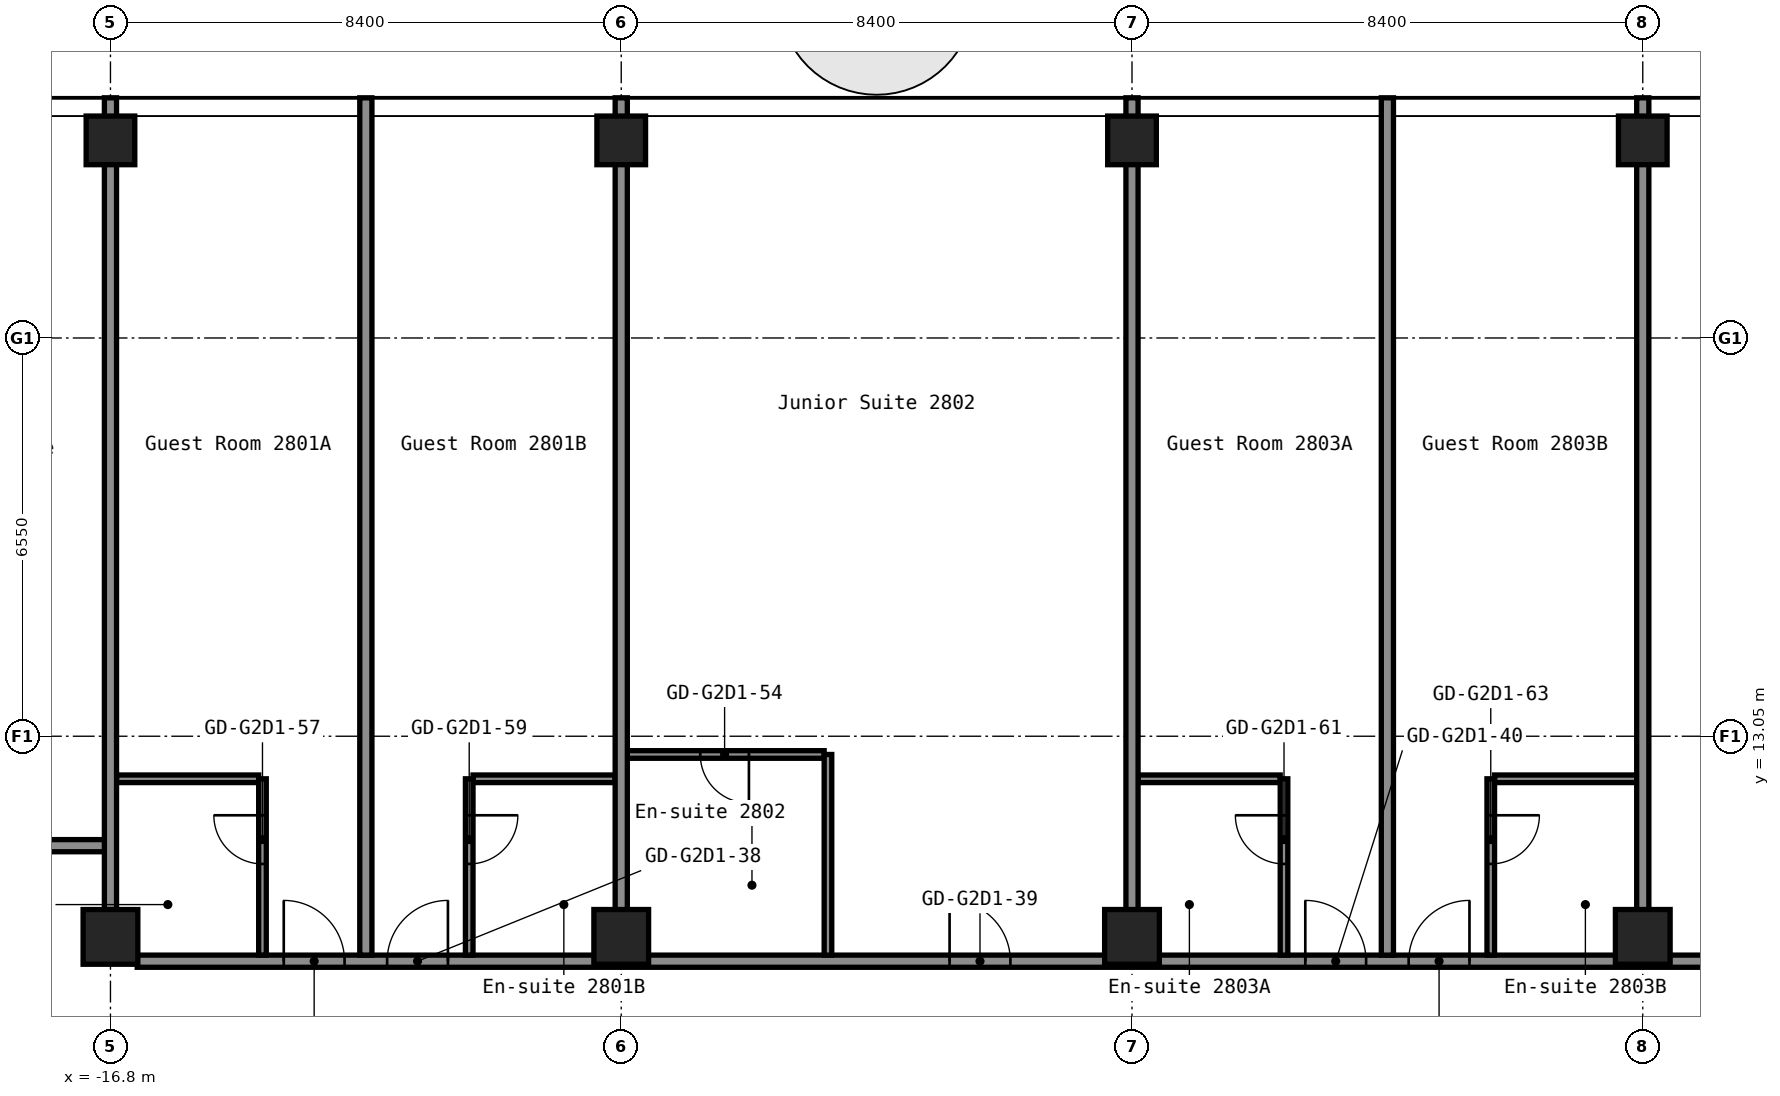
"""IFC4 building model, lengths in metres.
Left out: names, types, materials, properties, quantities, classifications, styles, units other than length and angle.
Written with IfcOpenShell. Run it as: python <this file> out.ifc"""

import sys

from ifc_helpers import new_model, si_unit, direction, frame, frame_2d, origin, origin_2d, place, context, subcontext, project, spatial, rectangle, hollow_rectangle, extrude, element, fill, save


model = new_model("IFC4")
c1 = context("Model", 3, precision=1e-05, world=origin(), true_north=direction((0.0, 1.0)))
c2 = subcontext(c1, "Body", "Model", "MODEL_VIEW")
j1 = project(units=[si_unit("LENGTHUNIT", "METRE"), si_unit("PLANEANGLEUNIT", "RADIAN")], contexts=[c1])
p1 = place(None, origin())
s1 = spatial("IfcSite", under=j1, at=p1, CompositionType="ELEMENT")
p2 = place(p1, origin())
s2 = spatial("IfcBuilding", under=s1, at=p2, CompositionType="ELEMENT")
p3 = place(p2, frame((0.0, 0.0, 101.0)))
s3 = spatial("IfcBuildingStorey", under=s2, at=p3, CompositionType="ELEMENT", Elevation=101.0)
p4 = place(p3, frame((-16.8, 9.75, 0.0), z_axis=(0.0, 0.0, 1.0), x_axis=(1.0, 0.0, 0.0)))
e1 = element("IfcColumn", 1, at=p4, inside=s3, PredefinedType="COLUMN", context=c2, shape_type="SweptSolid", body=[
    extrude(hollow_rectangle(XDim=0.9, YDim=0.9, WallThickness=0.036, at=origin_2d()), origin(), (0.0, 0.0, 1.0), 2.8),
])
p5 = place(p3, frame((-16.8, 22.85, 0.0), z_axis=(0.0, 0.0, 1.0), x_axis=(1.0, 0.0, 0.0)))
e2 = element("IfcColumn", 2, at=p5, inside=s3, PredefinedType="COLUMN", context=c2, shape_type="SweptSolid", body=[
    extrude(hollow_rectangle(XDim=0.8, YDim=0.8, WallThickness=0.032, at=origin_2d()), origin(), (0.0, 0.0, 1.0), 2.8),
])
p6 = place(p3, frame((-8.4, 9.75, 0.0), z_axis=(0.0, 0.0, 1.0), x_axis=(1.0, 0.0, 0.0)))
e3 = element("IfcColumn", 3, at=p6, inside=s3, PredefinedType="COLUMN", context=c2, shape_type="SweptSolid", body=[
    extrude(hollow_rectangle(XDim=0.9, YDim=0.9, WallThickness=0.036, at=origin_2d()), origin(), (0.0, 0.0, 1.0), 2.8),
])
p7 = place(p3, frame((-8.4, 22.85, 0.0), z_axis=(0.0, 0.0, 1.0), x_axis=(1.0, 0.0, 0.0)))
e4 = element("IfcColumn", 4, at=p7, inside=s3, PredefinedType="COLUMN", context=c2, shape_type="SweptSolid", body=[
    extrude(hollow_rectangle(XDim=0.8, YDim=0.8, WallThickness=0.032, at=origin_2d()), origin(), (0.0, 0.0, 1.0), 2.8),
])
p8 = place(p3, frame((0.0, 9.75, 0.0), z_axis=(0.0, 0.0, 1.0), x_axis=(1.0, 0.0, 0.0)))
e5 = element("IfcColumn", 5, at=p8, inside=s3, PredefinedType="COLUMN", context=c2, shape_type="SweptSolid", body=[
    extrude(hollow_rectangle(XDim=0.9, YDim=0.9, WallThickness=0.036, at=origin_2d()), origin(), (0.0, 0.0, 1.0), 2.8),
])
p9 = place(p3, frame((0.0, 22.85, 0.0), z_axis=(0.0, 0.0, 1.0), x_axis=(1.0, 0.0, 0.0)))
e6 = element("IfcColumn", 6, at=p9, inside=s3, PredefinedType="COLUMN", context=c2, shape_type="SweptSolid", body=[
    extrude(hollow_rectangle(XDim=0.8, YDim=0.8, WallThickness=0.032, at=origin_2d()), origin(), (0.0, 0.0, 1.0), 2.8),
])
p10 = place(p3, frame((8.4, 9.75, 0.0), z_axis=(0.0, 0.0, 1.0), x_axis=(1.0, 0.0, 0.0)))
e7 = element("IfcColumn", 7, at=p10, inside=s3, PredefinedType="COLUMN", context=c2, shape_type="SweptSolid", body=[
    extrude(hollow_rectangle(XDim=0.9, YDim=0.9, WallThickness=0.036, at=origin_2d()), origin(), (0.0, 0.0, 1.0), 2.8),
])
p11 = place(p3, frame((8.4, 22.85, 0.0), z_axis=(0.0, 0.0, 1.0), x_axis=(1.0, 0.0, 0.0)))
e8 = element("IfcColumn", 8, at=p11, inside=s3, PredefinedType="COLUMN", context=c2, shape_type="SweptSolid", body=[
    extrude(hollow_rectangle(XDim=0.8, YDim=0.8, WallThickness=0.032, at=origin_2d()), origin(), (0.0, 0.0, 1.0), 2.8),
])
p12 = place(p3, frame((-16.36, 9.35, 0.0), z_axis=(0.0, 0.0, 1.0), x_axis=(1.0, 0.0, 0.0)))
e9 = element("IfcWall", 9, at=p12, inside=s3, PredefinedType="PARTITIONING", context=c2, shape_type="SweptSolid", body=[
    extrude(rectangle(XDim=32.72, YDim=0.2, at=frame_2d((16.36, 0.0))), origin(), (0.0, 0.0, 1.0), 2.8),
])
p13 = place(p12, frame((2.41, 0.0, 0.0)))
e10 = element("IfcOpeningElement", 10, at=p13, cuts=e9, PredefinedType="OPENING", context=c2, shape_type="SweptSolid", body=[
    extrude(rectangle(XDim=1.0, YDim=2.1, at=frame_2d((0.5, 1.05))), frame((0.0, 0.11, 0.0), z_axis=(0.0, -1.0, 0.0), x_axis=(1.0, 0.0, 0.0)), (0.0, 0.0, 1.0), 0.22),
])
p14 = place(p12, frame((4.11, 0.0, 0.0)))
e11 = element("IfcOpeningElement", 11, at=p14, cuts=e9, PredefinedType="OPENING", context=c2, shape_type="SweptSolid", body=[
    extrude(rectangle(XDim=1.0, YDim=2.1, at=frame_2d((0.5, 1.05))), frame((0.0, 0.11, 0.0), z_axis=(0.0, -1.0, 0.0), x_axis=(1.0, 0.0, 0.0)), (0.0, 0.0, 1.0), 0.22),
])
p15 = place(p12, frame((13.36, 0.0, 0.0)))
e12 = element("IfcOpeningElement", 12, at=p15, cuts=e9, PredefinedType="OPENING", context=c2, shape_type="SweptSolid", body=[
    extrude(rectangle(XDim=1.0, YDim=2.1, at=frame_2d((0.5, 1.05))), frame((0.0, 0.11, 0.0), z_axis=(0.0, -1.0, 0.0), x_axis=(1.0, 0.0, 0.0)), (0.0, 0.0, 1.0), 0.22),
])
p16 = place(p12, frame((19.21, 0.0, 0.0)))
e13 = element("IfcOpeningElement", 13, at=p16, cuts=e9, PredefinedType="OPENING", context=c2, shape_type="SweptSolid", body=[
    extrude(rectangle(XDim=1.0, YDim=2.1, at=frame_2d((0.5, 1.05))), frame((0.0, 0.11, 0.0), z_axis=(0.0, -1.0, 0.0), x_axis=(1.0, 0.0, 0.0)), (0.0, 0.0, 1.0), 0.22),
])
p17 = place(p12, frame((20.91, 0.0, 0.0)))
e14 = element("IfcOpeningElement", 14, at=p17, cuts=e9, PredefinedType="OPENING", context=c2, shape_type="SweptSolid", body=[
    extrude(rectangle(XDim=1.0, YDim=2.1, at=frame_2d((0.5, 1.05))), frame((0.0, 0.11, 0.0), z_axis=(0.0, -1.0, 0.0), x_axis=(1.0, 0.0, 0.0)), (0.0, 0.0, 1.0), 0.22),
])
p18 = place(p12, frame((26.76, 0.0, 0.0)))
e15 = element("IfcOpeningElement", 15, at=p18, cuts=e9, PredefinedType="OPENING", context=c2, shape_type="SweptSolid", body=[
    extrude(rectangle(XDim=1.0, YDim=2.1, at=frame_2d((0.5, 1.05))), frame((0.0, 0.11, 0.0), z_axis=(0.0, -1.0, 0.0), x_axis=(1.0, 0.0, 0.0)), (0.0, 0.0, 1.0), 0.22),
])
p19 = place(p3, frame((-46.5, 11.25, 0.0), z_axis=(0.0, 0.0, 1.0), x_axis=(1.0, 0.0, 0.0)))
e16 = element("IfcWall", 16, at=p19, inside=s3, PredefinedType="PARTITIONING", context=c2, shape_type="SweptSolid", body=[
    extrude(rectangle(XDim=29.7, YDim=0.2, at=frame_2d((14.85, 0.0))), origin(), (0.0, 0.0, 1.0), 2.8),
])
p20 = place(p19, frame((1.95, 0.0, 0.0)))
e17 = element("IfcOpeningElement", 17, at=p20, cuts=e16, PredefinedType="OPENING", context=c2, shape_type="SweptSolid", body=[
    extrude(rectangle(XDim=0.9, YDim=2.1, at=frame_2d((0.45, 1.05))), frame((0.0, 0.11, 0.0), z_axis=(0.0, -1.0, 0.0), x_axis=(1.0, 0.0, 0.0)), (0.0, 0.0, 1.0), 0.22),
])
p21 = place(p19, frame((6.655, 0.0, 0.0)))
e18 = element("IfcOpeningElement", 18, at=p21, cuts=e16, PredefinedType="OPENING", context=c2, shape_type="SweptSolid", body=[
    extrude(rectangle(XDim=0.9, YDim=2.1, at=frame_2d((0.45, 1.05))), frame((0.0, 0.11, 0.0), z_axis=(0.0, -1.0, 0.0), x_axis=(1.0, 0.0, 0.0)), (0.0, 0.0, 1.0), 0.22),
])
p22 = place(p19, frame((10.855, 0.0, 0.0)))
e19 = element("IfcOpeningElement", 19, at=p22, cuts=e16, PredefinedType="OPENING", context=c2, shape_type="SweptSolid", body=[
    extrude(rectangle(XDim=0.9, YDim=2.1, at=frame_2d((0.45, 1.05))), frame((0.0, 0.11, 0.0), z_axis=(0.0, -1.0, 0.0), x_axis=(1.0, 0.0, 0.0)), (0.0, 0.0, 1.0), 0.22),
])
p23 = place(p19, frame((14.13, 0.0, 0.0)))
e20 = element("IfcOpeningElement", 20, at=p23, cuts=e16, PredefinedType="OPENING", context=c2, shape_type="SweptSolid", body=[
    extrude(rectangle(XDim=0.9, YDim=2.1, at=frame_2d((0.45, 1.05))), frame((0.0, 0.11, 0.0), z_axis=(0.0, -1.0, 0.0), x_axis=(1.0, 0.0, 0.0)), (0.0, 0.0, 1.0), 0.22),
])
p24 = place(p19, frame((18.33, 0.0, 0.0)))
e21 = element("IfcOpeningElement", 21, at=p24, cuts=e16, PredefinedType="OPENING", context=c2, shape_type="SweptSolid", body=[
    extrude(rectangle(XDim=0.9, YDim=2.1, at=frame_2d((0.45, 1.05))), frame((0.0, 0.11, 0.0), z_axis=(0.0, -1.0, 0.0), x_axis=(1.0, 0.0, 0.0)), (0.0, 0.0, 1.0), 0.22),
])
p25 = place(p19, frame((22.78, 0.0, 0.0)))
e22 = element("IfcOpeningElement", 22, at=p25, cuts=e16, PredefinedType="OPENING", context=c2, shape_type="SweptSolid", body=[
    extrude(rectangle(XDim=0.9, YDim=2.1, at=frame_2d((0.45, 1.05))), frame((0.0, 0.11, 0.0), z_axis=(0.0, -1.0, 0.0), x_axis=(1.0, 0.0, 0.0)), (0.0, 0.0, 1.0), 0.22),
])
p26 = place(p19, frame((26.98, 0.0, 0.0)))
e23 = element("IfcOpeningElement", 23, at=p26, cuts=e16, PredefinedType="OPENING", context=c2, shape_type="SweptSolid", body=[
    extrude(rectangle(XDim=0.9, YDim=2.1, at=frame_2d((0.45, 1.05))), frame((0.0, 0.11, 0.0), z_axis=(0.0, -1.0, 0.0), x_axis=(1.0, 0.0, 0.0)), (0.0, 0.0, 1.0), 0.22),
])
for number, where, z_axis, x_axis in (
    (24, (-16.7, 12.35, 0.0), (0.0, 0.0, 1.0), (1.0, 0.0, 0.0)),
    (25, (-10.837, 12.35, 0.0), (0.0, 0.0, 1.0), (1.0, 0.0, 0.0)),
    (26, (0.1, 12.35, 0.0), (0.0, 0.0, 1.0), (1.0, 0.0, 0.0)),
):
    element("IfcWall", number, at=place(p3, frame(where, z_axis=z_axis, x_axis=x_axis)), inside=s3, PredefinedType="PARTITIONING", context=c2, shape_type="SweptSolid", body=[
        extrude(rectangle(XDim=2.337, YDim=0.125, at=frame_2d((1.169, 0.0))), origin(), (0.0, 0.0, 1.0), 2.8),
    ])
p27 = place(p3, frame((5.962, 12.35, 0.0), z_axis=(0.0, 0.0, 1.0), x_axis=(1.0, 0.0, 0.0)))
e27 = element("IfcWall", 27, at=p27, inside=s3, PredefinedType="PARTITIONING", context=c2, shape_type="SweptSolid", body=[
    extrude(rectangle(XDim=2.338, YDim=0.125, at=frame_2d((1.169, 0.0))), origin(), (0.0, 0.0, 1.0), 2.8),
])
p28 = place(p3, frame((-8.3, 12.75, 0.0), z_axis=(0.0, 0.0, 1.0), x_axis=(1.0, 0.0, 0.0)))
e28 = element("IfcWall", 28, at=p28, inside=s3, PredefinedType="PARTITIONING", context=c2, shape_type="SweptSolid", body=[
    extrude(rectangle(XDim=3.238, YDim=0.125, at=frame_2d((1.619, 0.0))), origin(), (0.0, 0.0, 1.0), 2.8),
])
p29 = place(p28, frame((1.2, 0.0, 0.0)))
e29 = element("IfcOpeningElement", 29, at=p29, cuts=e28, PredefinedType="OPENING", context=c2, shape_type="SweptSolid", body=[
    extrude(rectangle(XDim=0.8, YDim=2.1, at=frame_2d((0.4, 1.05))), frame((0.0, 0.073, 0.0), z_axis=(0.0, -1.0, 0.0), x_axis=(1.0, 0.0, 0.0)), (0.0, 0.0, 1.0), 0.145),
])
p30 = place(p3, frame((-16.8, 10.19, 0.0), z_axis=(0.0, 0.0, 1.0), x_axis=(0.0, 1.0, 0.0)))
e30 = element("IfcWall", 30, at=p30, inside=s3, PredefinedType="PARTITIONING", context=c2, shape_type="SweptSolid", body=[
    extrude(rectangle(XDim=13.36, YDim=0.2, at=frame_2d((6.68, 0.0))), origin(), (0.0, 0.0, 1.0), 2.8),
])
p31 = place(p3, frame((-14.3, 9.45, 0.0), z_axis=(0.0, 0.0, 1.0), x_axis=(0.0, 1.0, 0.0)))
e31 = element("IfcWall", 31, at=p31, inside=s3, PredefinedType="PARTITIONING", context=c2, shape_type="SweptSolid", body=[
    extrude(rectangle(XDim=2.9, YDim=0.125, at=frame_2d((1.45, 0.0))), origin(), (0.0, 0.0, 1.0), 2.8),
])
p32 = place(p31, frame((1.5, 0.0, 0.0)))
e32 = element("IfcOpeningElement", 32, at=p32, cuts=e31, PredefinedType="OPENING", context=c2, shape_type="SweptSolid", body=[
    extrude(rectangle(XDim=0.8, YDim=2.1, at=frame_2d((0.4, 1.05))), frame((0.0, 0.073, 0.0), z_axis=(0.0, -1.0, 0.0), x_axis=(1.0, 0.0, 0.0)), (0.0, 0.0, 1.0), 0.145),
])
p33 = place(p3, frame((-12.6, 9.45, 0.0), z_axis=(0.0, 0.0, 1.0), x_axis=(0.0, 1.0, 0.0)))
e33 = element("IfcWall", 33, at=p33, inside=s3, PredefinedType="PARTITIONING", context=c2, shape_type="SweptSolid", body=[
    extrude(rectangle(XDim=14.1, YDim=0.2, at=frame_2d((7.05, 0.0))), origin(), (0.0, 0.0, 1.0), 2.8),
])
p34 = place(p3, frame((-10.9, 9.45, 0.0), z_axis=(0.0, 0.0, 1.0), x_axis=(0.0, 1.0, 0.0)))
e34 = element("IfcWall", 34, at=p34, inside=s3, PredefinedType="PARTITIONING", context=c2, shape_type="SweptSolid", body=[
    extrude(rectangle(XDim=2.9, YDim=0.125, at=frame_2d((1.45, 0.0))), origin(), (0.0, 0.0, 1.0), 2.8),
])
p35 = place(p34, frame((1.5, 0.0, 0.0)))
e35 = element("IfcOpeningElement", 35, at=p35, cuts=e34, PredefinedType="OPENING", context=c2, shape_type="SweptSolid", body=[
    extrude(rectangle(XDim=0.8, YDim=2.1, at=frame_2d((0.4, 1.05))), frame((0.0, 0.073, 0.0), z_axis=(0.0, -1.0, 0.0), x_axis=(1.0, 0.0, 0.0)), (0.0, 0.0, 1.0), 0.145),
])
p36 = place(p3, frame((-8.4, 10.19, 0.0), z_axis=(0.0, 0.0, 1.0), x_axis=(0.0, 1.0, 0.0)))
e36 = element("IfcWall", 36, at=p36, inside=s3, PredefinedType="PARTITIONING", context=c2, shape_type="SweptSolid", body=[
    extrude(rectangle(XDim=13.36, YDim=0.2, at=frame_2d((6.68, 0.0))), origin(), (0.0, 0.0, 1.0), 2.8),
])
p37 = place(p3, frame((-5.0, 9.45, 0.0), z_axis=(0.0, 0.0, 1.0), x_axis=(0.0, 1.0, 0.0)))
e37 = element("IfcWall", 37, at=p37, inside=s3, PredefinedType="PARTITIONING", context=c2, shape_type="SweptSolid", body=[
    extrude(rectangle(XDim=3.3, YDim=0.125, at=frame_2d((1.65, 0.0))), origin(), (0.0, 0.0, 1.0), 2.8),
])
p38 = place(p3, frame((0.0, 10.19, 0.0), z_axis=(0.0, 0.0, 1.0), x_axis=(0.0, 1.0, 0.0)))
e38 = element("IfcWall", 38, at=p38, inside=s3, PredefinedType="PARTITIONING", context=c2, shape_type="SweptSolid", body=[
    extrude(rectangle(XDim=13.36, YDim=0.2, at=frame_2d((6.68, 0.0))), origin(), (0.0, 0.0, 1.0), 2.8),
])
p39 = place(p3, frame((2.5, 9.45, 0.0), z_axis=(0.0, 0.0, 1.0), x_axis=(0.0, 1.0, 0.0)))
e39 = element("IfcWall", 39, at=p39, inside=s3, PredefinedType="PARTITIONING", context=c2, shape_type="SweptSolid", body=[
    extrude(rectangle(XDim=2.9, YDim=0.125, at=frame_2d((1.45, 0.0))), origin(), (0.0, 0.0, 1.0), 2.8),
])
p40 = place(p39, frame((1.5, 0.0, 0.0)))
e40 = element("IfcOpeningElement", 40, at=p40, cuts=e39, PredefinedType="OPENING", context=c2, shape_type="SweptSolid", body=[
    extrude(rectangle(XDim=0.8, YDim=2.1, at=frame_2d((0.4, 1.05))), frame((0.0, 0.073, 0.0), z_axis=(0.0, -1.0, 0.0), x_axis=(1.0, 0.0, 0.0)), (0.0, 0.0, 1.0), 0.145),
])
p41 = place(p3, frame((4.2, 9.45, 0.0), z_axis=(0.0, 0.0, 1.0), x_axis=(0.0, 1.0, 0.0)))
e41 = element("IfcWall", 41, at=p41, inside=s3, PredefinedType="PARTITIONING", context=c2, shape_type="SweptSolid", body=[
    extrude(rectangle(XDim=14.1, YDim=0.2, at=frame_2d((7.05, 0.0))), origin(), (0.0, 0.0, 1.0), 2.8),
])
p42 = place(p3, frame((5.9, 9.45, 0.0), z_axis=(0.0, 0.0, 1.0), x_axis=(0.0, 1.0, 0.0)))
e42 = element("IfcWall", 42, at=p42, inside=s3, PredefinedType="PARTITIONING", context=c2, shape_type="SweptSolid", body=[
    extrude(rectangle(XDim=2.9, YDim=0.125, at=frame_2d((1.45, 0.0))), origin(), (0.0, 0.0, 1.0), 2.8),
])
p43 = place(p42, frame((1.5, 0.0, 0.0)))
e43 = element("IfcOpeningElement", 43, at=p43, cuts=e42, PredefinedType="OPENING", context=c2, shape_type="SweptSolid", body=[
    extrude(rectangle(XDim=0.8, YDim=2.1, at=frame_2d((0.4, 1.05))), frame((0.0, 0.073, 0.0), z_axis=(0.0, -1.0, 0.0), x_axis=(1.0, 0.0, 0.0)), (0.0, 0.0, 1.0), 0.145),
])
p44 = place(p3, frame((8.4, 10.19, 0.0), z_axis=(0.0, 0.0, 1.0), x_axis=(0.0, 1.0, 0.0)))
e44 = element("IfcWall", 44, at=p44, inside=s3, PredefinedType="PARTITIONING", context=c2, shape_type="SweptSolid", body=[
    extrude(rectangle(XDim=13.36, YDim=0.2, at=frame_2d((6.68, 0.0))), origin(), (0.0, 0.0, 1.0), 2.8),
])
p45 = place(p13, origin())
e45 = element("IfcDoor", 45, at=p45, inside=s3, OperationType="SINGLE_SWING_RIGHT", PredefinedType="DOOR", context=c2, shape_type="SweptSolid", body=[
    extrude(rectangle(XDim=1.0, YDim=2.1, at=frame_2d((0.5, 1.05))), frame((0.0, 0.025, 0.0), z_axis=(0.0, -1.0, 0.0), x_axis=(1.0, 0.0, 0.0)), (0.0, 0.0, 1.0), 0.05),
])
fill(e10, e45)
p46 = place(p14, origin())
e46 = element("IfcDoor", 46, at=p46, inside=s3, OperationType="SINGLE_SWING_LEFT", PredefinedType="DOOR", context=c2, shape_type="SweptSolid", body=[
    extrude(rectangle(XDim=1.0, YDim=2.1, at=frame_2d((0.5, 1.05))), frame((0.0, 0.025, 0.0), z_axis=(0.0, -1.0, 0.0), x_axis=(1.0, 0.0, 0.0)), (0.0, 0.0, 1.0), 0.05),
])
fill(e11, e46)
p47 = place(p15, origin())
e47 = element("IfcDoor", 47, at=p47, inside=s3, OperationType="SINGLE_SWING_RIGHT", PredefinedType="DOOR", context=c2, shape_type="SweptSolid", body=[
    extrude(rectangle(XDim=1.0, YDim=2.1, at=frame_2d((0.5, 1.05))), frame((0.0, 0.025, 0.0), z_axis=(0.0, -1.0, 0.0), x_axis=(1.0, 0.0, 0.0)), (0.0, 0.0, 1.0), 0.05),
])
fill(e12, e47)
p48 = place(p16, origin())
e48 = element("IfcDoor", 48, at=p48, inside=s3, OperationType="SINGLE_SWING_RIGHT", PredefinedType="DOOR", context=c2, shape_type="SweptSolid", body=[
    extrude(rectangle(XDim=1.0, YDim=2.1, at=frame_2d((0.5, 1.05))), frame((0.0, 0.025, 0.0), z_axis=(0.0, -1.0, 0.0), x_axis=(1.0, 0.0, 0.0)), (0.0, 0.0, 1.0), 0.05),
])
fill(e13, e48)
p49 = place(p17, origin())
e49 = element("IfcDoor", 49, at=p49, inside=s3, OperationType="SINGLE_SWING_LEFT", PredefinedType="DOOR", context=c2, shape_type="SweptSolid", body=[
    extrude(rectangle(XDim=1.0, YDim=2.1, at=frame_2d((0.5, 1.05))), frame((0.0, 0.025, 0.0), z_axis=(0.0, -1.0, 0.0), x_axis=(1.0, 0.0, 0.0)), (0.0, 0.0, 1.0), 0.05),
])
fill(e14, e49)
p50 = place(p29, origin())
e50 = element("IfcDoor", 50, at=p50, inside=s3, OperationType="SINGLE_SWING_RIGHT", PredefinedType="DOOR", context=c2, shape_type="SweptSolid", body=[
    extrude(rectangle(XDim=0.8, YDim=2.1, at=frame_2d((0.4, 1.05))), frame((0.0, 0.025, 0.0), z_axis=(0.0, -1.0, 0.0), x_axis=(1.0, 0.0, 0.0)), (0.0, 0.0, 1.0), 0.05),
])
fill(e29, e50)
p51 = place(p32, origin())
e51 = element("IfcDoor", 51, at=p51, inside=s3, OperationType="SINGLE_SWING_LEFT", PredefinedType="DOOR", context=c2, shape_type="SweptSolid", body=[
    extrude(rectangle(XDim=0.8, YDim=2.1, at=frame_2d((0.4, 1.05))), frame((0.0, 0.025, 0.0), z_axis=(0.0, -1.0, 0.0), x_axis=(1.0, 0.0, 0.0)), (0.0, 0.0, 1.0), 0.05),
])
fill(e32, e51)
p52 = place(p35, origin())
e52 = element("IfcDoor", 52, at=p52, inside=s3, OperationType="SINGLE_SWING_RIGHT", PredefinedType="DOOR", context=c2, shape_type="SweptSolid", body=[
    extrude(rectangle(XDim=0.8, YDim=2.1, at=frame_2d((0.4, 1.05))), frame((0.0, 0.025, 0.0), z_axis=(0.0, -1.0, 0.0), x_axis=(1.0, 0.0, 0.0)), (0.0, 0.0, 1.0), 0.05),
])
fill(e35, e52)
p53 = place(p40, origin())
e53 = element("IfcDoor", 53, at=p53, inside=s3, OperationType="SINGLE_SWING_LEFT", PredefinedType="DOOR", context=c2, shape_type="SweptSolid", body=[
    extrude(rectangle(XDim=0.8, YDim=2.1, at=frame_2d((0.4, 1.05))), frame((0.0, 0.025, 0.0), z_axis=(0.0, -1.0, 0.0), x_axis=(1.0, 0.0, 0.0)), (0.0, 0.0, 1.0), 0.05),
])
fill(e40, e53)
p54 = place(p43, origin())
e54 = element("IfcDoor", 54, at=p54, inside=s3, OperationType="SINGLE_SWING_RIGHT", PredefinedType="DOOR", context=c2, shape_type="SweptSolid", body=[
    extrude(rectangle(XDim=0.8, YDim=2.1, at=frame_2d((0.4, 1.05))), frame((0.0, 0.025, 0.0), z_axis=(0.0, -1.0, 0.0), x_axis=(1.0, 0.0, 0.0)), (0.0, 0.0, 1.0), 0.05),
])
fill(e43, e54)
save(model, sys.argv[1])
